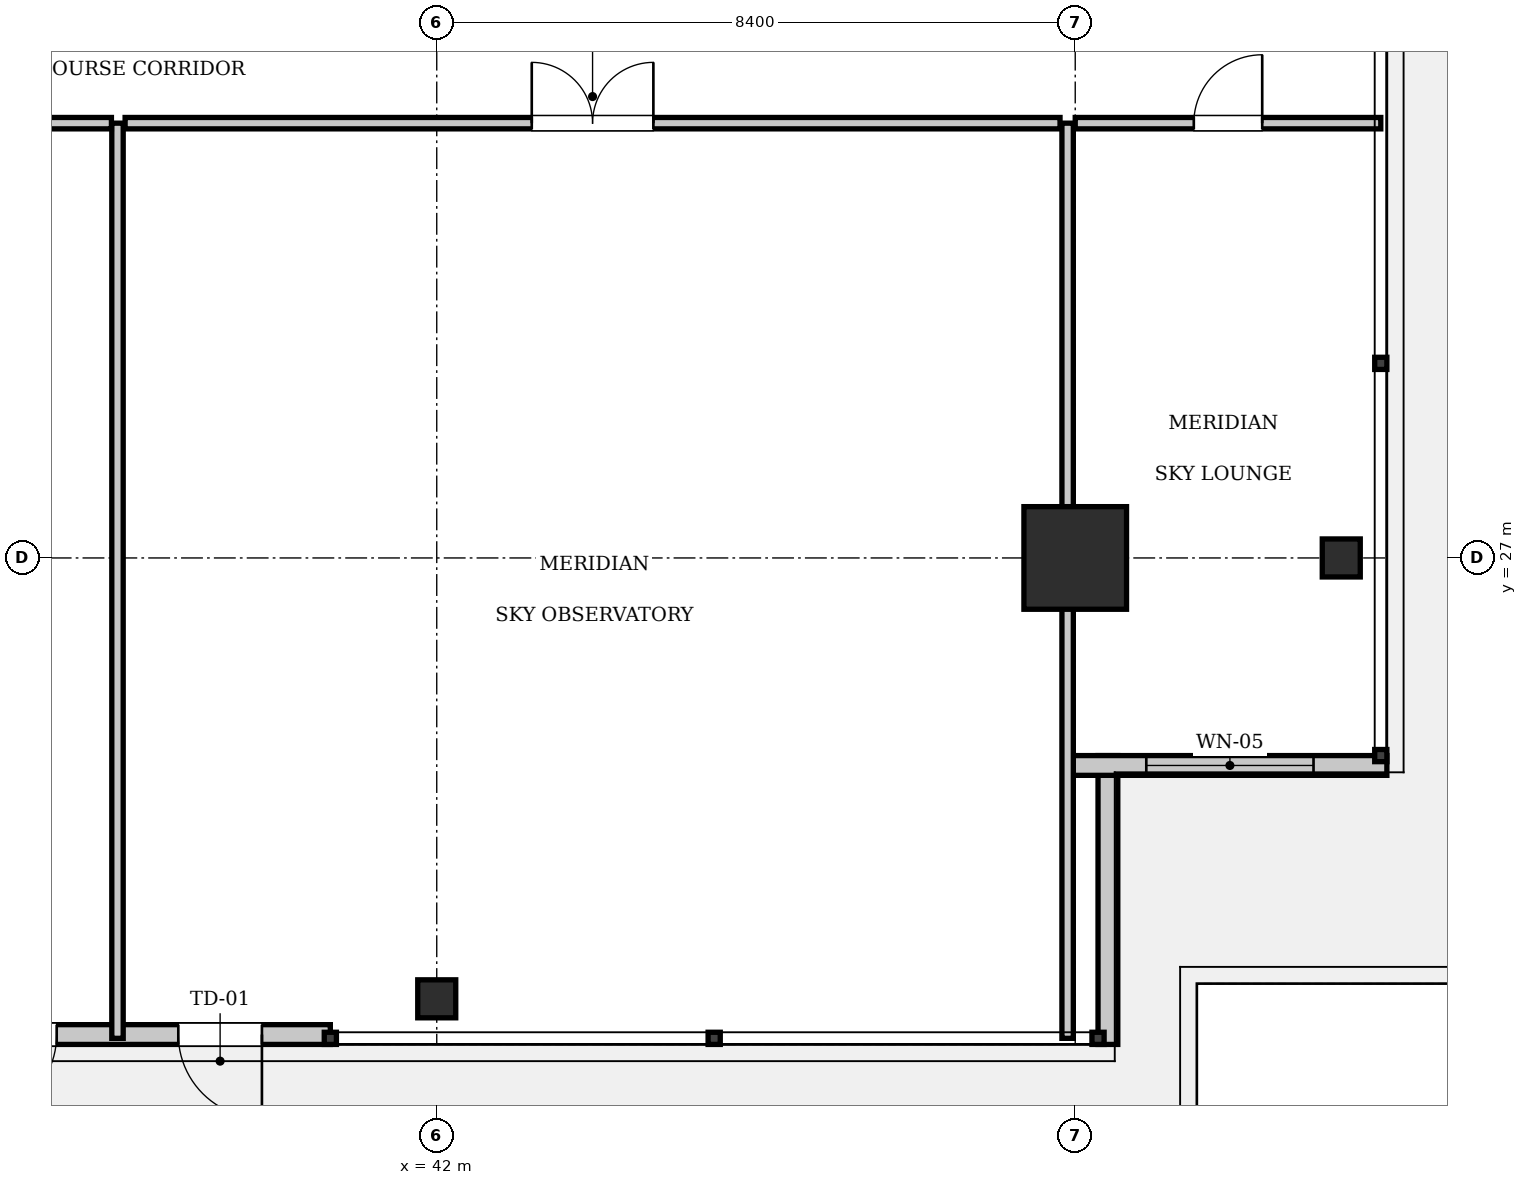
"""IFC4 building model, lengths in metres.
Left out: names, types, materials, properties, quantities, classifications, styles, units other than length and angle.
Written with IfcOpenShell. Run it as: python <this file> out.ifc"""

import sys

from ifc_helpers import new_model, si_unit, direction, frame, frame_2d, origin, origin_2d, place, context, subcontext, project, spatial, rectangle, i_section, extrude, element, fill, save


model = new_model("IFC4")
c1 = context("Model", 3, precision=1e-05, world=origin(), true_north=direction((0.0, 1.0)))
c2 = subcontext(c1, "Body", "Model", "MODEL_VIEW")
j1 = project(units=[si_unit("LENGTHUNIT", "METRE"), si_unit("PLANEANGLEUNIT", "RADIAN")], contexts=[c1])
p1 = place(None, origin())
s1 = spatial("IfcSite", under=j1, at=p1, CompositionType="ELEMENT")
p2 = place(p1, origin())
s2 = spatial("IfcBuilding", under=s1, at=p2, CompositionType="ELEMENT")
p3 = place(p2, frame((0.0, 0.0, 359.1)))
s3 = spatial("IfcBuildingStorey", under=s2, at=p3, CompositionType="ELEMENT", Elevation=359.1)
p4 = place(p3, frame((50.4, 27.0, 0.0), z_axis=(0.0, 0.0, 1.0), x_axis=(1.0, 0.0, 0.0)))
e1 = element("IfcColumn", 1, at=p4, inside=s3, PredefinedType="COLUMN", context=c2, shape_type="SweptSolid", body=[
    extrude(rectangle(XDim=1.35, YDim=1.35, at=origin_2d()), origin(), (0.0, 0.0, 1.0), 5.25),
])
for number, where, z_axis, x_axis in (
    (2, (53.9, 27.0, -0.26), (0.0, 0.0, 1.0), (1.0, 0.0, 0.0)),
    (3, (42.0, 21.2, -0.26), (0.0, 0.0, 1.0), (1.0, 0.0, 0.0)),
):
    element("IfcColumn", number, at=place(p3, frame(where, z_axis=z_axis, x_axis=x_axis)), inside=s3, PredefinedType="COLUMN", context=c2, shape_type="SweptSolid", body=[
        extrude(i_section(OverallWidth=0.5, OverallDepth=0.5, WebThickness=0.022, FlangeThickness=0.032, at=origin_2d()), origin(), (0.0, 0.0, 1.0), 5.51),
    ])
p5 = place(p3, frame((50.83, 24.4, 0.0), z_axis=(0.0, 0.0, 1.0), x_axis=(0.0, -1.0, 0.0)))
e4 = element("IfcWall", 4, at=p5, inside=s3, PredefinedType="SOLIDWALL", context=c2, shape_type="SweptSolid", body=[
    extrude(rectangle(XDim=3.8, YDim=0.26, at=frame_2d((1.9, 0.0))), origin(), (0.0, 0.0, 1.0), 4.97),
])
p6 = place(p3, frame((54.5, 24.27, 0.0), z_axis=(0.0, 0.0, 1.0), x_axis=(-1.0, 0.0, 0.0)))
e5 = element("IfcWall", 5, at=p6, inside=s3, PredefinedType="SOLIDWALL", context=c2, shape_type="SweptSolid", body=[
    extrude(rectangle(XDim=4.13, YDim=0.26, at=frame_2d((2.065, 0.0))), origin(), (0.0, 0.0, 1.0), 4.97),
])
p7 = place(p6, frame((0.965, 0.0, 0.9)))
e6 = element("IfcOpeningElement", 6, at=p7, cuts=e5, PredefinedType="OPENING", context=c2, shape_type="SweptSolid", body=[
    extrude(rectangle(XDim=2.2, YDim=2.8, at=frame_2d((1.1, 1.4))), frame((0.0, 0.14, 0.0), z_axis=(0.0, -1.0, 0.0), x_axis=(1.0, 0.0, 0.0)), (0.0, 0.0, 1.0), 0.28),
])
p8 = place(p3, frame((40.6, 20.73, 0.0), z_axis=(0.0, 0.0, 1.0), x_axis=(-1.0, 0.0, 0.0)))
e7 = element("IfcWall", 7, at=p8, inside=s3, PredefinedType="SOLIDWALL", context=c2, shape_type="SweptSolid", body=[
    extrude(rectangle(XDim=5.6, YDim=0.26, at=frame_2d((2.8, 0.0))), origin(), (0.0, 0.0, 1.0), 4.97),
])
p9 = place(p8, frame((0.9, 0.0, 0.0)))
e8 = element("IfcOpeningElement", 8, at=p9, cuts=e7, PredefinedType="OPENING", context=c2, shape_type="SweptSolid", body=[
    extrude(rectangle(XDim=1.1, YDim=2.2, at=frame_2d((0.55, 1.1))), frame((0.0, 0.14, 0.0), z_axis=(0.0, -1.0, 0.0), x_axis=(1.0, 0.0, 0.0)), (0.0, 0.0, 1.0), 0.28),
])
p10 = place(p8, frame((3.6, 0.0, 0.0)))
e9 = element("IfcOpeningElement", 9, at=p10, cuts=e7, PredefinedType="OPENING", context=c2, shape_type="SweptSolid", body=[
    extrude(rectangle(XDim=1.1, YDim=2.2, at=frame_2d((0.55, 1.1))), frame((0.0, 0.14, 0.0), z_axis=(0.0, -1.0, 0.0), x_axis=(1.0, 0.0, 0.0)), (0.0, 0.0, 1.0), 0.28),
])
p11 = place(p3, frame((37.8, 20.68, 0.0), z_axis=(0.0, 0.0, 1.0), x_axis=(0.0, 1.0, 0.0)))
e10 = element("IfcWall", 10, at=p11, inside=s3, PredefinedType="PARTITIONING", context=c2, shape_type="SweptSolid", body=[
    extrude(rectangle(XDim=12.04, YDim=0.15, at=frame_2d((6.02, 0.0))), origin(), (0.0, 0.0, 1.0), 4.97),
])
p12 = place(p3, frame((50.3, 20.68, 0.0), z_axis=(0.0, 0.0, 1.0), x_axis=(0.0, 1.0, 0.0)))
e11 = element("IfcWall", 11, at=p12, inside=s3, PredefinedType="PARTITIONING", context=c2, shape_type="SweptSolid", body=[
    extrude(rectangle(XDim=12.04, YDim=0.15, at=frame_2d((6.02, 0.0))), origin(), (0.0, 0.0, 1.0), 4.507),
])
p13 = place(p3, frame((31.98, 32.72, 0.0), z_axis=(0.0, 0.0, 1.0), x_axis=(1.0, 0.0, 0.0)))
e12 = element("IfcWall", 12, at=p13, inside=s3, PredefinedType="PARTITIONING", context=c2, shape_type="SweptSolid", body=[
    extrude(rectangle(XDim=5.74, YDim=0.15, at=frame_2d((2.87, 0.0))), origin(), (0.0, 0.0, 1.0), 4.97),
])
p14 = place(p13, frame((2.07, 0.0, 0.0)))
e13 = element("IfcOpeningElement", 13, at=p14, cuts=e12, PredefinedType="OPENING", context=c2, shape_type="SweptSolid", body=[
    extrude(rectangle(XDim=1.6, YDim=2.3, at=frame_2d((0.8, 1.15))), frame((0.0, 0.085, 0.0), z_axis=(0.0, -1.0, 0.0), x_axis=(1.0, 0.0, 0.0)), (0.0, 0.0, 1.0), 0.17),
])
p15 = place(p3, frame((37.9, 32.72, 0.0), z_axis=(0.0, 0.0, 1.0), x_axis=(1.0, 0.0, 0.0)))
e14 = element("IfcWall", 14, at=p15, inside=s3, PredefinedType="PARTITIONING", context=c2, shape_type="SweptSolid", body=[
    extrude(rectangle(XDim=12.3, YDim=0.15, at=frame_2d((6.15, 0.0))), origin(), (0.0, 0.0, 1.0), 4.97),
])
p16 = place(p15, frame((5.35, 0.0, 0.0)))
e15 = element("IfcOpeningElement", 15, at=p16, cuts=e14, PredefinedType="OPENING", context=c2, shape_type="SweptSolid", body=[
    extrude(rectangle(XDim=1.6, YDim=2.3, at=frame_2d((0.8, 1.15))), frame((0.0, 0.085, 0.0), z_axis=(0.0, -1.0, 0.0), x_axis=(1.0, 0.0, 0.0)), (0.0, 0.0, 1.0), 0.17),
])
p17 = place(p3, frame((50.4, 32.72, 0.0), z_axis=(0.0, 0.0, 1.0), x_axis=(1.0, 0.0, 0.0)))
e16 = element("IfcWall", 16, at=p17, inside=s3, PredefinedType="PARTITIONING", context=c2, shape_type="SweptSolid", body=[
    extrude(rectangle(XDim=4.02, YDim=0.15, at=frame_2d((2.01, 0.0))), origin(), (0.0, 0.0, 1.0), 4.97),
])
p18 = place(p17, frame((1.56, 0.0, 0.0)))
e17 = element("IfcOpeningElement", 17, at=p18, cuts=e16, PredefinedType="OPENING", context=c2, shape_type="SweptSolid", body=[
    extrude(rectangle(XDim=0.9, YDim=2.1, at=frame_2d((0.45, 1.05))), frame((0.0, 0.085, 0.0), z_axis=(0.0, -1.0, 0.0), x_axis=(1.0, 0.0, 0.0)), (0.0, 0.0, 1.0), 0.17),
])
p19 = place(p7, origin())
e18 = element("IfcWindow", 18, at=p19, inside=s3, PartitioningType="SINGLE_PANEL", PredefinedType="WINDOW", context=c2, shape_type="SweptSolid", body=[
    extrude(rectangle(XDim=2.2, YDim=2.8, at=frame_2d((1.1, 1.4))), frame((0.0, 0.03, 0.0), z_axis=(0.0, -1.0, 0.0), x_axis=(1.0, 0.0, 0.0)), (0.0, 0.0, 1.0), 0.06),
])
fill(e6, e18)
p20 = place(p9, origin())
e19 = element("IfcDoor", 19, at=p20, inside=s3, OperationType="SINGLE_SWING_LEFT", PredefinedType="DOOR", context=c2, shape_type="SweptSolid", body=[
    extrude(rectangle(XDim=1.1, YDim=2.2, at=frame_2d((0.55, 1.1))), frame((0.0, 0.025, 0.0), z_axis=(0.0, -1.0, 0.0), x_axis=(1.0, 0.0, 0.0)), (0.0, 0.0, 1.0), 0.05),
])
fill(e8, e19)
p21 = place(p10, origin())
e20 = element("IfcDoor", 20, at=p21, inside=s3, OperationType="SINGLE_SWING_RIGHT", PredefinedType="DOOR", context=c2, shape_type="SweptSolid", body=[
    extrude(rectangle(XDim=1.1, YDim=2.2, at=frame_2d((0.55, 1.1))), frame((0.0, 0.025, 0.0), z_axis=(0.0, -1.0, 0.0), x_axis=(1.0, 0.0, 0.0)), (0.0, 0.0, 1.0), 0.05),
])
fill(e9, e20)
p22 = place(p16, origin())
e21 = element("IfcDoor", 21, at=p22, inside=s3, OperationType="DOUBLE_DOOR_SINGLE_SWING", PredefinedType="DOOR", context=c2, shape_type="SweptSolid", body=[
    extrude(rectangle(XDim=1.6, YDim=2.3, at=frame_2d((0.8, 1.15))), frame((0.0, 0.025, 0.0), z_axis=(0.0, -1.0, 0.0), x_axis=(1.0, 0.0, 0.0)), (0.0, 0.0, 1.0), 0.05),
])
fill(e15, e21)
p23 = place(p18, origin())
e22 = element("IfcDoor", 22, at=p23, inside=s3, OperationType="SINGLE_SWING_RIGHT", PredefinedType="DOOR", context=c2, shape_type="SweptSolid", body=[
    extrude(rectangle(XDim=0.9, YDim=2.1, at=frame_2d((0.45, 1.05))), frame((0.0, 0.025, 0.0), z_axis=(0.0, -1.0, 0.0), x_axis=(1.0, 0.0, 0.0)), (0.0, 0.0, 1.0), 0.05),
])
fill(e17, e22)
save(model, sys.argv[1])
